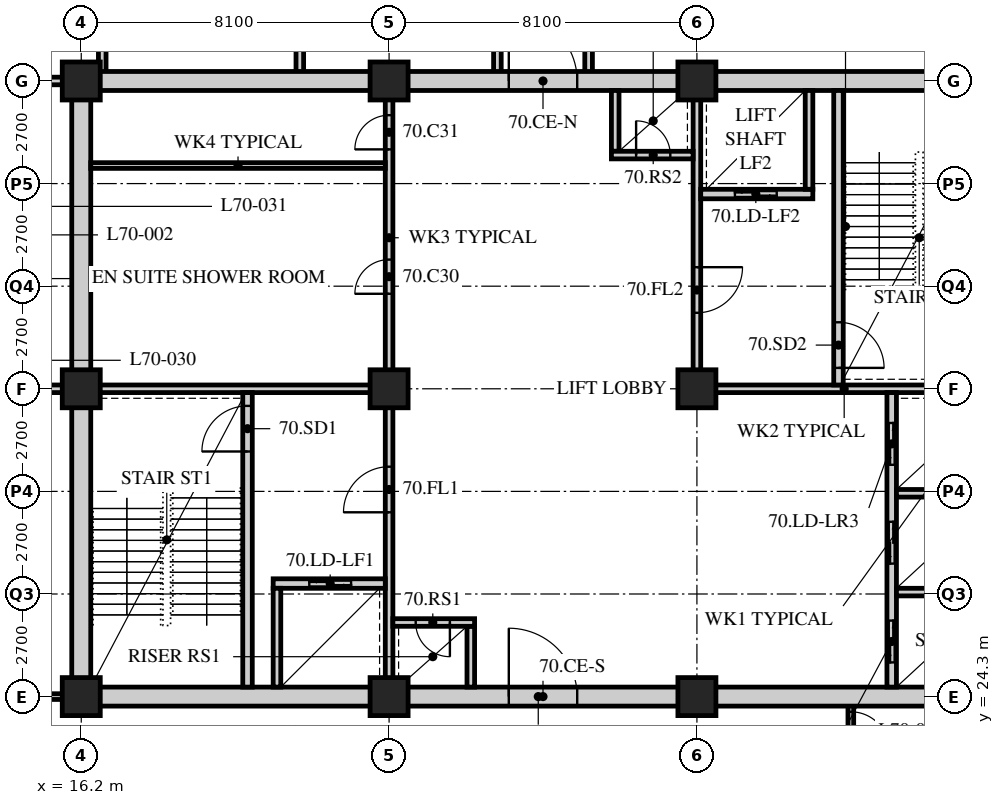
"""IFC4 building model, lengths in metres.
Left out: names, types, materials, properties, quantities, classifications, styles, units other than length and angle.
Written with IfcOpenShell. Run it as: python <this file> out.ifc"""

import sys

from ifc_helpers import new_model, si_unit, direction, frame, frame_2d, origin, origin_2d, place, context, subcontext, project, spatial, rectangle, hollow_rectangle, extrude, element, fill, save


model = new_model("IFC4")
c1 = context("Model", 3, precision=1e-05, world=origin(), true_north=direction((0.0, 1.0)))
c2 = subcontext(c1, "Body", "Model", "MODEL_VIEW")
j1 = project(units=[si_unit("LENGTHUNIT", "METRE"), si_unit("PLANEANGLEUNIT", "RADIAN")], contexts=[c1])
p1 = place(None, origin())
s1 = spatial("IfcSite", under=j1, at=p1, CompositionType="ELEMENT")
p2 = place(p1, origin())
s2 = spatial("IfcBuilding", under=s1, at=p2, CompositionType="ELEMENT")
p3 = place(p2, frame((0.0, 0.0, 273.6)))
s3 = spatial("IfcBuildingStorey", under=s2, at=p3, CompositionType="ELEMENT", Elevation=273.6)
for number, where, z_axis, x_axis in (
    (1, (16.2, 24.3, 0.0), (0.0, 0.0, 1.0), (1.0, 0.0, 0.0)),
    (2, (16.2, 32.4, 0.0), (0.0, 0.0, 1.0), (1.0, 0.0, 0.0)),
    (3, (16.2, 40.5, 0.0), (0.0, 0.0, 1.0), (1.0, 0.0, 0.0)),
    (4, (24.3, 24.3, 0.0), (0.0, 0.0, 1.0), (1.0, 0.0, 0.0)),
    (5, (24.3, 32.4, 0.0), (0.0, 0.0, 1.0), (1.0, 0.0, 0.0)),
    (6, (24.3, 40.5, 0.0), (0.0, 0.0, 1.0), (1.0, 0.0, 0.0)),
    (7, (32.4, 24.3, 0.0), (0.0, 0.0, 1.0), (1.0, 0.0, 0.0)),
    (8, (32.4, 32.4, 0.0), (0.0, 0.0, 1.0), (1.0, 0.0, 0.0)),
    (9, (32.4, 40.5, 0.0), (0.0, 0.0, 1.0), (1.0, 0.0, 0.0)),
):
    element("IfcColumn", number, at=place(p3, frame(where, z_axis=z_axis, x_axis=x_axis)), inside=s3, PredefinedType="COLUMN", context=c2, shape_type="SweptSolid", body=[
        extrude(hollow_rectangle(XDim=1.0, YDim=1.0, WallThickness=0.1, at=origin_2d()), origin(), (0.0, 0.0, 1.0), 3.9),
    ])
p4 = place(p3, frame((16.0, 24.3, 0.0), z_axis=(0.0, 0.0, 1.0), x_axis=(-1.0, 0.0, 0.0)))
e10 = element("IfcWall", 10, at=p4, inside=s3, PredefinedType="PARTITIONING", context=c2, shape_type="SweptSolid", body=[
    extrude(rectangle(XDim=2.05, YDim=0.15, at=frame_2d((1.025, 0.0))), origin(), (0.0, 0.0, 1.0), 3.078),
])
p5 = place(p3, frame((13.95, 32.4, 0.0), z_axis=(0.0, 0.0, 1.0), x_axis=(1.0, 0.0, 0.0)))
e11 = element("IfcWall", 11, at=p5, inside=s3, PredefinedType="SOLIDWALL", context=c2, shape_type="SweptSolid", body=[
    extrude(rectangle(XDim=2.25, YDim=0.2, at=frame_2d((1.125, 0.0))), origin(), (0.0, 0.0, 1.0), 3.078),
])
for number, where, z_axis, x_axis in (
    (12, (16.752, 50.85, 0.0), (0.0, 0.0, 1.0), (0.0, -1.0, 0.0)),
    (13, (21.951, 50.85, 0.0), (0.0, 0.0, 1.0), (0.0, -1.0, 0.0)),
    (14, (27.15, 40.5, 0.0), (0.0, 0.0, 1.0), (0.0, 1.0, 0.0)),
    (15, (29.55, 40.5, 0.0), (0.0, 0.0, 1.0), (0.0, 1.0, 0.0)),
):
    element("IfcWall", number, at=place(p3, frame(where, z_axis=z_axis, x_axis=x_axis)), inside=s3, PredefinedType="SOLIDWALL", context=c2, shape_type="SweptSolid", body=[
        extrude(rectangle(XDim=10.35, YDim=0.2, at=frame_2d((5.175, 0.0))), origin(), (0.0, 0.0, 1.0), 3.69),
    ])
p6 = place(p3, frame((36.45, 22.5, 0.0), z_axis=(0.0, 0.0, 1.0), x_axis=(0.0, 1.0, 0.0)))
e16 = element("IfcWall", 16, at=p6, inside=s3, PredefinedType="PARTITIONING", context=c2, shape_type="SweptSolid", body=[
    extrude(rectangle(XDim=1.8, YDim=0.15, at=frame_2d((0.9, 0.0))), origin(), (0.0, 0.0, 1.0), 3.69),
])
p7 = place(p6, frame((0.4, 0.0, 0.0)))
e17 = element("IfcOpeningElement", 17, at=p7, cuts=e16, PredefinedType="OPENING", context=c2, shape_type="SweptSolid", body=[
    extrude(rectangle(XDim=1.0, YDim=2.1, at=frame_2d((0.5, 1.05))), frame((0.0, 0.085, 0.0), z_axis=(0.0, -1.0, 0.0), x_axis=(1.0, 0.0, 0.0)), (0.0, 0.0, 1.0), 0.17),
])
p8 = place(p3, frame((13.95, 40.5, 0.0), z_axis=(0.0, 0.0, 1.0), x_axis=(1.0, 0.0, 0.0)))
e18 = element("IfcWall", 18, at=p8, inside=s3, PredefinedType="SOLIDWALL", context=c2, shape_type="SweptSolid", body=[
    extrude(rectangle(XDim=2.25, YDim=0.2, at=frame_2d((1.125, 0.0))), origin(), (0.0, 0.0, 1.0), 3.078),
])
p9 = place(p3, frame((15.95, 24.3, 0.0), z_axis=(0.0, 0.0, 1.0), x_axis=(1.0, 0.0, 0.0)))
e19 = element("IfcWall", 19, at=p9, inside=s3, PredefinedType="SOLIDWALL", context=c2, shape_type="SweptSolid", body=[
    extrude(rectangle(XDim=24.55, YDim=0.5, at=frame_2d((12.275, 0.0))), origin(), (0.0, 0.0, 1.0), 3.04),
])
p10 = place(p9, frame((11.5, 0.0, 0.0)))
e20 = element("IfcOpeningElement", 20, at=p10, cuts=e19, PredefinedType="OPENING", context=c2, shape_type="SweptSolid", body=[
    extrude(rectangle(XDim=1.8, YDim=2.4, at=frame_2d((0.9, 1.2))), frame((0.0, 0.26, 0.0), z_axis=(0.0, -1.0, 0.0), x_axis=(1.0, 0.0, 0.0)), (0.0, 0.0, 1.0), 0.52),
])
p11 = place(p3, frame((15.95, 40.5, 0.0), z_axis=(0.0, 0.0, 1.0), x_axis=(1.0, 0.0, 0.0)))
e21 = element("IfcWall", 21, at=p11, inside=s3, PredefinedType="SOLIDWALL", context=c2, shape_type="SweptSolid", body=[
    extrude(rectangle(XDim=24.55, YDim=0.5, at=frame_2d((12.275, 0.0))), origin(), (0.0, 0.0, 1.0), 3.04),
])
p12 = place(p11, frame((11.5, 0.0, 0.0)))
e22 = element("IfcOpeningElement", 22, at=p12, cuts=e21, PredefinedType="OPENING", context=c2, shape_type="SweptSolid", body=[
    extrude(rectangle(XDim=1.8, YDim=2.4, at=frame_2d((0.9, 1.2))), frame((0.0, 0.26, 0.0), z_axis=(0.0, -1.0, 0.0), x_axis=(1.0, 0.0, 0.0)), (0.0, 0.0, 1.0), 0.52),
])
p13 = place(p3, frame((16.2, 24.55, 0.0), z_axis=(0.0, 0.0, 1.0), x_axis=(0.0, 1.0, 0.0)))
e23 = element("IfcWall", 23, at=p13, inside=s3, PredefinedType="SOLIDWALL", context=c2, shape_type="SweptSolid", body=[
    extrude(rectangle(XDim=15.7, YDim=0.5, at=frame_2d((7.85, 0.0))), origin(), (0.0, 0.0, 1.0), 3.078),
])
p14 = place(p3, frame((16.45, 32.4, 0.0), z_axis=(0.0, 0.0, 1.0), x_axis=(1.0, 0.0, 0.0)))
e24 = element("IfcWall", 24, at=p14, inside=s3, PredefinedType="SOLIDWALL", context=c2, shape_type="SweptSolid", body=[
    extrude(rectangle(XDim=7.95, YDim=0.2, at=frame_2d((3.975, 0.0))), origin(), (0.0, 0.0, 1.0), 3.078),
])
p15 = place(p3, frame((24.3, 24.55, 0.0), z_axis=(0.0, 0.0, 1.0), x_axis=(0.0, 1.0, 0.0)))
e25 = element("IfcWall", 25, at=p15, inside=s3, PredefinedType="SOLIDWALL", context=c2, shape_type="SweptSolid", body=[
    extrude(rectangle(XDim=7.75, YDim=0.2, at=frame_2d((3.875, 0.0))), origin(), (0.0, 0.0, 1.0), 3.078),
])
p16 = place(p15, frame((4.6, 0.0, 0.0)))
e26 = element("IfcOpeningElement", 26, at=p16, cuts=e25, PredefinedType="OPENING", context=c2, shape_type="SweptSolid", body=[
    extrude(rectangle(XDim=1.2, YDim=2.1, at=frame_2d((0.6, 1.05))), frame((0.0, 0.11, 0.0), z_axis=(0.0, -1.0, 0.0), x_axis=(1.0, 0.0, 0.0)), (0.0, 0.0, 1.0), 0.22),
])
p17 = place(p3, frame((20.575, 24.55, 0.0), z_axis=(0.0, 0.0, 1.0), x_axis=(0.0, 1.0, 0.0)))
e27 = element("IfcWall", 27, at=p17, inside=s3, PredefinedType="SOLIDWALL", context=c2, shape_type="SweptSolid", body=[
    extrude(rectangle(XDim=7.75, YDim=0.25, at=frame_2d((3.875, 0.0))), origin(), (0.0, 0.0, 1.0), 3.69),
])
p18 = place(p17, frame((6.2, 0.0, 0.0)))
e28 = element("IfcOpeningElement", 28, at=p18, cuts=e27, PredefinedType="OPENING", context=c2, shape_type="SweptSolid", body=[
    extrude(rectangle(XDim=1.2, YDim=2.1, at=frame_2d((0.6, 1.05))), frame((0.0, 0.135, 0.0), z_axis=(0.0, -1.0, 0.0), x_axis=(1.0, 0.0, 0.0)), (0.0, 0.0, 1.0), 0.27),
])
p19 = place(p3, frame((21.25, 27.275, 0.0), z_axis=(0.0, 0.0, 1.0), x_axis=(1.0, 0.0, 0.0)))
e29 = element("IfcWall", 29, at=p19, inside=s3, PredefinedType="SOLIDWALL", context=c2, shape_type="SweptSolid", body=[
    extrude(rectangle(XDim=2.95, YDim=0.25, at=frame_2d((1.475, 0.0))), origin(), (0.0, 0.0, 1.0), 3.69),
])
p20 = place(p19, frame((0.95, 0.0, 0.0)))
e30 = element("IfcOpeningElement", 30, at=p20, cuts=e29, PredefinedType="OPENING", context=c2, shape_type="SweptSolid", body=[
    extrude(rectangle(XDim=1.1, YDim=2.4, at=frame_2d((0.55, 1.2))), frame((0.0, 0.135, 0.0), z_axis=(0.0, -1.0, 0.0), x_axis=(1.0, 0.0, 0.0)), (0.0, 0.0, 1.0), 0.27),
])
p21 = place(p3, frame((21.35, 24.55, 0.0), z_axis=(0.0, 0.0, 1.0), x_axis=(0.0, 1.0, 0.0)))
e31 = element("IfcWall", 31, at=p21, inside=s3, PredefinedType="SOLIDWALL", context=c2, shape_type="SweptSolid", body=[
    extrude(rectangle(XDim=2.6, YDim=0.2, at=frame_2d((1.3, 0.0))), origin(), (0.0, 0.0, 1.0), 3.69),
])
p22 = place(p3, frame((26.45, 24.55, 0.0), z_axis=(0.0, 0.0, 1.0), x_axis=(0.0, 1.0, 0.0)))
e32 = element("IfcWall", 32, at=p22, inside=s3, PredefinedType="SOLIDWALL", context=c2, shape_type="SweptSolid", body=[
    extrude(rectangle(XDim=1.6, YDim=0.2, at=frame_2d((0.8, 0.0))), origin(), (0.0, 0.0, 1.0), 3.69),
])
p23 = place(p3, frame((24.4, 26.25, 0.0), z_axis=(0.0, 0.0, 1.0), x_axis=(1.0, 0.0, 0.0)))
e33 = element("IfcWall", 33, at=p23, inside=s3, PredefinedType="SOLIDWALL", context=c2, shape_type="SweptSolid", body=[
    extrude(rectangle(XDim=2.15, YDim=0.2, at=frame_2d((1.075, 0.0))), origin(), (0.0, 0.0, 1.0), 3.69),
])
p24 = place(p23, frame((0.6, 0.0, 0.0)))
e34 = element("IfcOpeningElement", 34, at=p24, cuts=e33, PredefinedType="OPENING", context=c2, shape_type="SweptSolid", body=[
    extrude(rectangle(XDim=0.9, YDim=2.1, at=frame_2d((0.45, 1.05))), frame((0.0, 0.11, 0.0), z_axis=(0.0, -1.0, 0.0), x_axis=(1.0, 0.0, 0.0)), (0.0, 0.0, 1.0), 0.22),
])
p25 = place(p3, frame((32.3, 32.4, 0.0), z_axis=(0.0, 0.0, 1.0), x_axis=(1.0, 0.0, 0.0)))
e35 = element("IfcWall", 35, at=p25, inside=s3, PredefinedType="SOLIDWALL", context=c2, shape_type="SweptSolid", body=[
    extrude(rectangle(XDim=7.95, YDim=0.2, at=frame_2d((3.975, 0.0))), origin(), (0.0, 0.0, 1.0), 3.078),
])
p26 = place(p3, frame((32.4, 32.5, 0.0), z_axis=(0.0, 0.0, 1.0), x_axis=(0.0, 1.0, 0.0)))
e36 = element("IfcWall", 36, at=p26, inside=s3, PredefinedType="SOLIDWALL", context=c2, shape_type="SweptSolid", body=[
    extrude(rectangle(XDim=7.75, YDim=0.2, at=frame_2d((3.875, 0.0))), origin(), (0.0, 0.0, 1.0), 3.078),
])
p27 = place(p26, frame((1.9, 0.0, 0.0)))
e37 = element("IfcOpeningElement", 37, at=p27, cuts=e36, PredefinedType="OPENING", context=c2, shape_type="SweptSolid", body=[
    extrude(rectangle(XDim=1.2, YDim=2.1, at=frame_2d((0.6, 1.05))), frame((0.0, 0.11, 0.0), z_axis=(0.0, -1.0, 0.0), x_axis=(1.0, 0.0, 0.0)), (0.0, 0.0, 1.0), 0.22),
])
p28 = place(p3, frame((37.525, 24.55, 0.0), z_axis=(0.0, 0.0, 1.0), x_axis=(0.0, 1.0, 0.0)))
e38 = element("IfcWall", 38, at=p28, inside=s3, PredefinedType="SOLIDWALL", context=c2, shape_type="SweptSolid", body=[
    extrude(rectangle(XDim=7.75, YDim=0.25, at=frame_2d((3.875, 0.0))), origin(), (0.0, 0.0, 1.0), 3.69),
])
p29 = place(p28, frame((0.65, 0.0, 0.0)))
e39 = element("IfcOpeningElement", 39, at=p29, cuts=e38, PredefinedType="OPENING", context=c2, shape_type="SweptSolid", body=[
    extrude(rectangle(XDim=1.1, YDim=2.4, at=frame_2d((0.55, 1.2))), frame((0.0, 0.135, 0.0), z_axis=(0.0, -1.0, 0.0), x_axis=(1.0, 0.0, 0.0)), (0.0, 0.0, 1.0), 0.27),
])
p30 = place(p28, frame((3.25, 0.0, 0.0)))
e40 = element("IfcOpeningElement", 40, at=p30, cuts=e38, PredefinedType="OPENING", context=c2, shape_type="SweptSolid", body=[
    extrude(rectangle(XDim=1.1, YDim=2.4, at=frame_2d((0.55, 1.2))), frame((0.0, 0.135, 0.0), z_axis=(0.0, -1.0, 0.0), x_axis=(1.0, 0.0, 0.0)), (0.0, 0.0, 1.0), 0.27),
])
p31 = place(p28, frame((5.85, 0.0, 0.0)))
e41 = element("IfcOpeningElement", 41, at=p31, cuts=e38, PredefinedType="OPENING", context=c2, shape_type="SweptSolid", body=[
    extrude(rectangle(XDim=1.1, YDim=2.4, at=frame_2d((0.55, 1.2))), frame((0.0, 0.135, 0.0), z_axis=(0.0, -1.0, 0.0), x_axis=(1.0, 0.0, 0.0)), (0.0, 0.0, 1.0), 0.27),
])
for number, where, z_axis, x_axis in (
    (42, (37.65, 27.05, 0.0), (0.0, 0.0, 1.0), (1.0, 0.0, 0.0)),
    (43, (37.65, 29.65, 0.0), (0.0, 0.0, 1.0), (1.0, 0.0, 0.0)),
):
    element("IfcWall", number, at=place(p3, frame(where, z_axis=z_axis, x_axis=x_axis)), inside=s3, PredefinedType="SOLIDWALL", context=c2, shape_type="SweptSolid", body=[
        extrude(rectangle(XDim=2.6, YDim=0.2, at=frame_2d((1.3, 0.0))), origin(), (0.0, 0.0, 1.0), 3.69),
    ])
p32 = place(p3, frame((36.125, 32.5, 0.0), z_axis=(0.0, 0.0, 1.0), x_axis=(0.0, 1.0, 0.0)))
e44 = element("IfcWall", 44, at=p32, inside=s3, PredefinedType="SOLIDWALL", context=c2, shape_type="SweptSolid", body=[
    extrude(rectangle(XDim=7.75, YDim=0.25, at=frame_2d((3.875, 0.0))), origin(), (0.0, 0.0, 1.0), 3.69),
])
p33 = place(p32, frame((0.45, 0.0, 0.0)))
e45 = element("IfcOpeningElement", 45, at=p33, cuts=e44, PredefinedType="OPENING", context=c2, shape_type="SweptSolid", body=[
    extrude(rectangle(XDim=1.2, YDim=2.1, at=frame_2d((0.6, 1.05))), frame((0.0, 0.135, 0.0), z_axis=(0.0, -1.0, 0.0), x_axis=(1.0, 0.0, 0.0)), (0.0, 0.0, 1.0), 0.27),
])
p34 = place(p3, frame((32.5, 37.525, 0.0), z_axis=(0.0, 0.0, 1.0), x_axis=(1.0, 0.0, 0.0)))
e46 = element("IfcWall", 46, at=p34, inside=s3, PredefinedType="SOLIDWALL", context=c2, shape_type="SweptSolid", body=[
    extrude(rectangle(XDim=2.95, YDim=0.25, at=frame_2d((1.475, 0.0))), origin(), (0.0, 0.0, 1.0), 3.69),
])
p35 = place(p34, frame((0.9, 0.0, 0.0)))
e47 = element("IfcOpeningElement", 47, at=p35, cuts=e46, PredefinedType="OPENING", context=c2, shape_type="SweptSolid", body=[
    extrude(rectangle(XDim=1.1, YDim=2.4, at=frame_2d((0.55, 1.2))), frame((0.0, 0.135, 0.0), z_axis=(0.0, -1.0, 0.0), x_axis=(1.0, 0.0, 0.0)), (0.0, 0.0, 1.0), 0.27),
])
p36 = place(p3, frame((35.35, 37.65, 0.0), z_axis=(0.0, 0.0, 1.0), x_axis=(0.0, 1.0, 0.0)))
e48 = element("IfcWall", 48, at=p36, inside=s3, PredefinedType="SOLIDWALL", context=c2, shape_type="SweptSolid", body=[
    extrude(rectangle(XDim=2.6, YDim=0.2, at=frame_2d((1.3, 0.0))), origin(), (0.0, 0.0, 1.0), 3.69),
])
p37 = place(p3, frame((30.25, 38.65, 0.0), z_axis=(0.0, 0.0, 1.0), x_axis=(0.0, 1.0, 0.0)))
e49 = element("IfcWall", 49, at=p37, inside=s3, PredefinedType="SOLIDWALL", context=c2, shape_type="SweptSolid", body=[
    extrude(rectangle(XDim=1.6, YDim=0.2, at=frame_2d((0.8, 0.0))), origin(), (0.0, 0.0, 1.0), 3.69),
])
p38 = place(p3, frame((30.15, 38.55, 0.0), z_axis=(0.0, 0.0, 1.0), x_axis=(1.0, 0.0, 0.0)))
e50 = element("IfcWall", 50, at=p38, inside=s3, PredefinedType="SOLIDWALL", context=c2, shape_type="SweptSolid", body=[
    extrude(rectangle(XDim=2.15, YDim=0.2, at=frame_2d((1.075, 0.0))), origin(), (0.0, 0.0, 1.0), 3.69),
])
p39 = place(p38, frame((0.65, 0.0, 0.0)))
e51 = element("IfcOpeningElement", 51, at=p39, cuts=e50, PredefinedType="OPENING", context=c2, shape_type="SweptSolid", body=[
    extrude(rectangle(XDim=0.9, YDim=2.1, at=frame_2d((0.45, 1.05))), frame((0.0, 0.11, 0.0), z_axis=(0.0, -1.0, 0.0), x_axis=(1.0, 0.0, 0.0)), (0.0, 0.0, 1.0), 0.22),
])
p40 = place(p3, frame((24.3, 32.5, 0.0), z_axis=(0.0, 0.0, 1.0), x_axis=(0.0, 1.0, 0.0)))
e52 = element("IfcWall", 52, at=p40, inside=s3, PredefinedType="PARTITIONING", context=c2, shape_type="SweptSolid", body=[
    extrude(rectangle(XDim=7.75, YDim=0.2, at=frame_2d((3.875, 0.0))), origin(), (0.0, 0.0, 1.0), 3.078),
])
p41 = place(p40, frame((2.4, 0.0, 0.0)))
e53 = element("IfcOpeningElement", 53, at=p41, cuts=e52, PredefinedType="OPENING", context=c2, shape_type="SweptSolid", body=[
    extrude(rectangle(XDim=0.9, YDim=2.1, at=frame_2d((0.45, 1.05))), frame((0.0, 0.11, 0.0), z_axis=(0.0, -1.0, 0.0), x_axis=(1.0, 0.0, 0.0)), (0.0, 0.0, 1.0), 0.22),
])
p42 = place(p40, frame((6.2, 0.0, 0.0)))
e54 = element("IfcOpeningElement", 54, at=p42, cuts=e52, PredefinedType="OPENING", context=c2, shape_type="SweptSolid", body=[
    extrude(rectangle(XDim=0.9, YDim=2.1, at=frame_2d((0.45, 1.05))), frame((0.0, 0.11, 0.0), z_axis=(0.0, -1.0, 0.0), x_axis=(1.0, 0.0, 0.0)), (0.0, 0.0, 1.0), 0.22),
])
p43 = place(p3, frame((16.45, 38.275, 0.0), z_axis=(0.0, 0.0, 1.0), x_axis=(1.0, 0.0, 0.0)))
e55 = element("IfcWall", 55, at=p43, inside=s3, PredefinedType="PARTITIONING", context=c2, shape_type="SweptSolid", body=[
    extrude(rectangle(XDim=7.75, YDim=0.15, at=frame_2d((3.875, 0.0))), origin(), (0.0, 0.0, 1.0), 3.69),
])
p44 = place(p7, origin())
e56 = element("IfcDoor", 56, at=p44, inside=s3, OperationType="SINGLE_SWING_RIGHT", PredefinedType="DOOR", context=c2, shape_type="SweptSolid", body=[
    extrude(rectangle(XDim=1.0, YDim=2.1, at=frame_2d((0.5, 1.05))), frame((0.0, 0.025, 0.0), z_axis=(0.0, -1.0, 0.0), x_axis=(1.0, 0.0, 0.0)), (0.0, 0.0, 1.0), 0.05),
])
fill(e17, e56)
p45 = place(p41, origin())
e57 = element("IfcDoor", 57, at=p45, inside=s3, OperationType="SINGLE_SWING_LEFT", PredefinedType="DOOR", context=c2, shape_type="SweptSolid", body=[
    extrude(rectangle(XDim=0.9, YDim=2.1, at=frame_2d((0.45, 1.05))), frame((0.0, 0.025, 0.0), z_axis=(0.0, -1.0, 0.0), x_axis=(1.0, 0.0, 0.0)), (0.0, 0.0, 1.0), 0.05),
])
fill(e53, e57)
p46 = place(p42, origin())
e58 = element("IfcDoor", 58, at=p46, inside=s3, OperationType="SINGLE_SWING_LEFT", PredefinedType="DOOR", context=c2, shape_type="SweptSolid", body=[
    extrude(rectangle(XDim=0.9, YDim=2.1, at=frame_2d((0.45, 1.05))), frame((0.0, 0.025, 0.0), z_axis=(0.0, -1.0, 0.0), x_axis=(1.0, 0.0, 0.0)), (0.0, 0.0, 1.0), 0.05),
])
fill(e54, e58)
p47 = place(p18, origin())
e59 = element("IfcDoor", 59, at=p47, inside=s3, OperationType="SINGLE_SWING_LEFT", PredefinedType="DOOR", context=c2, shape_type="SweptSolid", body=[
    extrude(rectangle(XDim=1.2, YDim=2.1, at=frame_2d((0.6, 1.05))), frame((0.0, 0.025, 0.0), z_axis=(0.0, -1.0, 0.0), x_axis=(1.0, 0.0, 0.0)), (0.0, 0.0, 1.0), 0.05),
])
fill(e28, e59)
p48 = place(p16, origin())
e60 = element("IfcDoor", 60, at=p48, inside=s3, OperationType="SINGLE_SWING_LEFT", PredefinedType="DOOR", context=c2, shape_type="SweptSolid", body=[
    extrude(rectangle(XDim=1.2, YDim=2.1, at=frame_2d((0.6, 1.05))), frame((0.0, 0.025, 0.0), z_axis=(0.0, -1.0, 0.0), x_axis=(1.0, 0.0, 0.0)), (0.0, 0.0, 1.0), 0.05),
])
fill(e26, e60)
p49 = place(p24, origin())
e61 = element("IfcDoor", 61, at=p49, inside=s3, OperationType="SINGLE_SWING_LEFT", PredefinedType="DOOR", context=c2, shape_type="SweptSolid", body=[
    extrude(rectangle(XDim=0.9, YDim=2.1, at=frame_2d((0.45, 1.05))), frame((0.0, 0.025, 0.0), z_axis=(0.0, -1.0, 0.0), x_axis=(1.0, 0.0, 0.0)), (0.0, 0.0, 1.0), 0.05),
])
fill(e34, e61)
p50 = place(p33, origin())
e62 = element("IfcDoor", 62, at=p50, inside=s3, OperationType="SINGLE_SWING_RIGHT", PredefinedType="DOOR", context=c2, shape_type="SweptSolid", body=[
    extrude(rectangle(XDim=1.2, YDim=2.1, at=frame_2d((0.6, 1.05))), frame((0.0, 0.025, 0.0), z_axis=(0.0, -1.0, 0.0), x_axis=(1.0, 0.0, 0.0)), (0.0, 0.0, 1.0), 0.05),
])
fill(e45, e62)
p51 = place(p27, origin())
e63 = element("IfcDoor", 63, at=p51, inside=s3, OperationType="SINGLE_SWING_LEFT", PredefinedType="DOOR", context=c2, shape_type="SweptSolid", body=[
    extrude(rectangle(XDim=1.2, YDim=2.1, at=frame_2d((0.6, 1.05))), frame((0.0, 0.025, 0.0), z_axis=(0.0, -1.0, 0.0), x_axis=(1.0, 0.0, 0.0)), (0.0, 0.0, 1.0), 0.05),
])
fill(e37, e63)
p52 = place(p39, origin())
e64 = element("IfcDoor", 64, at=p52, inside=s3, OperationType="SINGLE_SWING_LEFT", PredefinedType="DOOR", context=c2, shape_type="SweptSolid", body=[
    extrude(rectangle(XDim=0.9, YDim=2.1, at=frame_2d((0.45, 1.05))), frame((0.0, 0.025, 0.0), z_axis=(0.0, -1.0, 0.0), x_axis=(1.0, 0.0, 0.0)), (0.0, 0.0, 1.0), 0.05),
])
fill(e51, e64)
p53 = place(p29, origin())
e65 = element("IfcDoor", 65, at=p53, inside=s3, OperationType="DOUBLE_DOOR_SLIDING", PredefinedType="DOOR", context=c2, shape_type="SweptSolid", body=[
    extrude(rectangle(XDim=1.1, YDim=2.4, at=frame_2d((0.55, 1.2))), frame((0.0, 0.025, 0.0), z_axis=(0.0, -1.0, 0.0), x_axis=(1.0, 0.0, 0.0)), (0.0, 0.0, 1.0), 0.05),
])
fill(e39, e65)
p54 = place(p30, origin())
e66 = element("IfcDoor", 66, at=p54, inside=s3, OperationType="DOUBLE_DOOR_SLIDING", PredefinedType="DOOR", context=c2, shape_type="SweptSolid", body=[
    extrude(rectangle(XDim=1.1, YDim=2.4, at=frame_2d((0.55, 1.2))), frame((0.0, 0.025, 0.0), z_axis=(0.0, -1.0, 0.0), x_axis=(1.0, 0.0, 0.0)), (0.0, 0.0, 1.0), 0.05),
])
fill(e40, e66)
p55 = place(p31, origin())
e67 = element("IfcDoor", 67, at=p55, inside=s3, OperationType="DOUBLE_DOOR_SLIDING", PredefinedType="DOOR", context=c2, shape_type="SweptSolid", body=[
    extrude(rectangle(XDim=1.1, YDim=2.4, at=frame_2d((0.55, 1.2))), frame((0.0, 0.025, 0.0), z_axis=(0.0, -1.0, 0.0), x_axis=(1.0, 0.0, 0.0)), (0.0, 0.0, 1.0), 0.05),
])
fill(e41, e67)
p56 = place(p20, origin())
e68 = element("IfcDoor", 68, at=p56, inside=s3, OperationType="DOUBLE_DOOR_SLIDING", PredefinedType="DOOR", context=c2, shape_type="SweptSolid", body=[
    extrude(rectangle(XDim=1.1, YDim=2.4, at=frame_2d((0.55, 1.2))), frame((0.0, 0.025, 0.0), z_axis=(0.0, -1.0, 0.0), x_axis=(1.0, 0.0, 0.0)), (0.0, 0.0, 1.0), 0.05),
])
fill(e30, e68)
p57 = place(p35, origin())
e69 = element("IfcDoor", 69, at=p57, inside=s3, OperationType="DOUBLE_DOOR_SLIDING", PredefinedType="DOOR", context=c2, shape_type="SweptSolid", body=[
    extrude(rectangle(XDim=1.1, YDim=2.4, at=frame_2d((0.55, 1.2))), frame((0.0, 0.025, 0.0), z_axis=(0.0, -1.0, 0.0), x_axis=(1.0, 0.0, 0.0)), (0.0, 0.0, 1.0), 0.05),
])
fill(e47, e69)
p58 = place(p10, origin())
e70 = element("IfcDoor", 70, at=p58, inside=s3, OperationType="DOUBLE_DOOR_SINGLE_SWING", PredefinedType="DOOR", context=c2, shape_type="SweptSolid", body=[
    extrude(rectangle(XDim=1.8, YDim=2.4, at=frame_2d((0.9, 1.2))), frame((0.0, 0.025, 0.0), z_axis=(0.0, -1.0, 0.0), x_axis=(1.0, 0.0, 0.0)), (0.0, 0.0, 1.0), 0.05),
])
fill(e20, e70)
p59 = place(p12, origin())
e71 = element("IfcDoor", 71, at=p59, inside=s3, OperationType="DOUBLE_DOOR_SINGLE_SWING", PredefinedType="DOOR", context=c2, shape_type="SweptSolid", body=[
    extrude(rectangle(XDim=1.8, YDim=2.4, at=frame_2d((0.9, 1.2))), frame((0.0, 0.025, 0.0), z_axis=(0.0, -1.0, 0.0), x_axis=(1.0, 0.0, 0.0)), (0.0, 0.0, 1.0), 0.05),
])
fill(e22, e71)
save(model, sys.argv[1])
